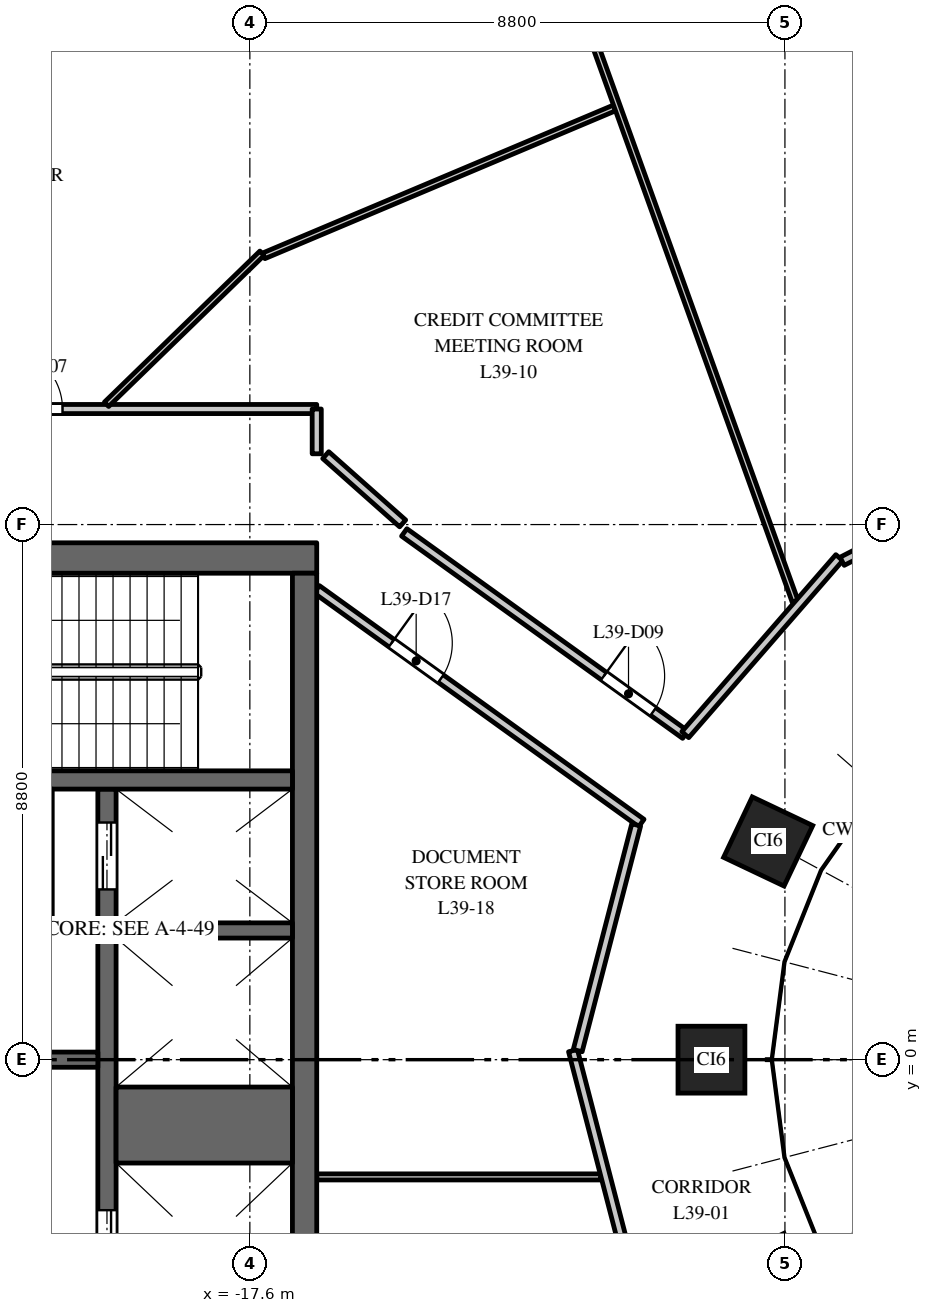
"""IFC4 building model, lengths in metres.
Left out: names, types, materials, properties, quantities, classifications, styles, units other than length and angle.
Written with IfcOpenShell. Run it as: python <this file> out.ifc"""

import sys

from ifc_helpers import new_model, si_unit, direction, frame, frame_2d, origin, origin_2d, place, context, subcontext, project, spatial, rectangle, extrude, element, fill, save


model = new_model("IFC4")
c1 = context("Model", 3, precision=1e-05, world=origin(), true_north=direction((0.0, 1.0)))
c2 = subcontext(c1, "Body", "Model", "MODEL_VIEW")
j1 = project(units=[si_unit("LENGTHUNIT", "METRE"), si_unit("PLANEANGLEUNIT", "RADIAN")], contexts=[c1])
p1 = place(None, origin())
s1 = spatial("IfcSite", under=j1, at=p1, CompositionType="ELEMENT")
p2 = place(p1, origin())
s2 = spatial("IfcBuilding", under=s1, at=p2, CompositionType="ELEMENT")
p3 = place(p2, frame((0.0, 0.0, 170.0)))
s3 = spatial("IfcBuildingStorey", under=s2, at=p3, CompositionType="ELEMENT", Elevation=170.0)
for number, where, z_axis, x_axis in (
    (1, (-9.076, 3.588, 0.0), (0.0, 0.0, 1.0), (-0.429, -0.903, 0.0)),
    (2, (-10.008, 0.0, 0.0), (0.0, 0.0, 1.0), (0.0, -1.0, 0.0)),
):
    element("IfcColumn", number, at=place(p3, frame(where, z_axis=z_axis, x_axis=x_axis)), inside=s3, PredefinedType="COLUMN", context=c2, shape_type="SweptSolid", body=[
        extrude(rectangle(XDim=1.1, YDim=1.1, at=origin_2d()), origin(), (0.0, 0.0, 1.0), 4.0),
    ])
p4 = place(p3, frame((-16.5, 8.25, 0.0), z_axis=(0.0, 0.0, 1.0), x_axis=(-1.0, 0.0, 0.0)))
e3 = element("IfcWall", 3, at=p4, inside=s3, PredefinedType="SHEAR", context=c2, shape_type="SweptSolid", body=[
    extrude(rectangle(XDim=15.0, YDim=0.5, at=frame_2d((7.5, 0.0))), origin(), (0.0, 0.0, 1.0), 3.7),
])
p5 = place(p4, frame((6.9, 0.0, 0.0)))
e4 = element("IfcOpeningElement", 4, at=p5, cuts=e3, PredefinedType="OPENING", context=c2, shape_type="SweptSolid", body=[
    extrude(rectangle(XDim=1.2, YDim=2.1, at=frame_2d((0.6, 1.05))), frame((0.0, 0.26, 0.0), z_axis=(0.0, -1.0, 0.0), x_axis=(1.0, 0.0, 0.0)), (0.0, 0.0, 1.0), 0.52),
])
p6 = place(p4, frame((12.05, 0.0, 0.0)))
e5 = element("IfcOpeningElement", 5, at=p6, cuts=e3, PredefinedType="OPENING", context=c2, shape_type="SweptSolid", body=[
    extrude(rectangle(XDim=0.9, YDim=2.1, at=frame_2d((0.45, 1.05))), frame((0.0, 0.26, 0.0), z_axis=(0.0, -1.0, 0.0), x_axis=(1.0, 0.0, 0.0)), (0.0, 0.0, 1.0), 0.52),
])
p7 = place(p3, frame((-19.95, -4.45, 0.0), z_axis=(0.0, 0.0, 1.0), x_axis=(0.0, 1.0, 0.0)))
e6 = element("IfcWall", 6, at=p7, inside=s3, PredefinedType="SHEAR", context=c2, shape_type="SweptSolid", body=[
    extrude(rectangle(XDim=8.9, YDim=0.3, at=frame_2d((4.45, 0.0))), origin(), (0.0, 0.0, 1.0), 3.7),
])
p8 = place(p7, frame((0.775, 0.0, 0.0)))
e7 = element("IfcOpeningElement", 7, at=p8, cuts=e6, PredefinedType="OPENING", context=c2, shape_type="SweptSolid", body=[
    extrude(rectangle(XDim=1.2, YDim=2.1, at=frame_2d((0.6, 1.05))), frame((0.0, 0.16, 0.0), z_axis=(0.0, -1.0, 0.0), x_axis=(1.0, 0.0, 0.0)), (0.0, 0.0, 1.0), 0.32),
])
p9 = place(p7, frame((7.25, 0.0, 0.0)))
e8 = element("IfcOpeningElement", 8, at=p9, cuts=e6, PredefinedType="OPENING", context=c2, shape_type="SweptSolid", body=[
    extrude(rectangle(XDim=1.1, YDim=2.1, at=frame_2d((0.55, 1.05))), frame((0.0, 0.16, 0.0), z_axis=(0.0, -1.0, 0.0), x_axis=(1.0, 0.0, 0.0)), (0.0, 0.0, 1.0), 0.32),
])
p10 = place(p3, frame((-20.1, 0.0, 0.0), z_axis=(0.0, 0.0, 1.0), x_axis=(-1.0, 0.0, 0.0)))
e9 = element("IfcWall", 9, at=p10, inside=s3, PredefinedType="SHEAR", context=c2, shape_type="SweptSolid", body=[
    extrude(rectangle(XDim=3.28, YDim=0.25, at=frame_2d((1.64, 0.0))), origin(), (0.0, 0.0, 1.0), 3.7),
])
p11 = place(p3, frame((-16.7, -8.0, 0.0), z_axis=(0.0, 0.0, 1.0), x_axis=(0.0, 1.0, 0.0)))
e10 = element("IfcWall", 10, at=p11, inside=s3, PredefinedType="SHEAR", context=c2, shape_type="SweptSolid", body=[
    extrude(rectangle(XDim=16.0, YDim=0.4, at=frame_2d((8.0, 0.0))), origin(), (0.0, 0.0, 1.0), 3.7),
])
p12 = place(p3, frame((-16.9, -1.075, 0.0), z_axis=(0.0, 0.0, 1.0), x_axis=(-1.0, 0.0, 0.0)))
e11 = element("IfcWall", 11, at=p12, inside=s3, PredefinedType="SHEAR", context=c2, shape_type="SweptSolid", body=[
    extrude(rectangle(XDim=2.9, YDim=1.25, at=frame_2d((1.45, 0.0))), origin(), (0.0, 0.0, 1.0), 3.7),
])
p13 = place(p3, frame((-16.9, 2.125, 0.0), z_axis=(0.0, 0.0, 1.0), x_axis=(-1.0, 0.0, 0.0)))
e12 = element("IfcWall", 12, at=p13, inside=s3, PredefinedType="SHEAR", context=c2, shape_type="SweptSolid", body=[
    extrude(rectangle(XDim=2.9, YDim=0.25, at=frame_2d((1.45, 0.0))), origin(), (0.0, 0.0, 1.0), 3.7),
])
p14 = place(p3, frame((-16.9, 4.6, 0.0), z_axis=(0.0, 0.0, 1.0), x_axis=(-1.0, 0.0, 0.0)))
e13 = element("IfcWall", 13, at=p14, inside=s3, PredefinedType="SHEAR", context=c2, shape_type="SweptSolid", body=[
    extrude(rectangle(XDim=6.18, YDim=0.3, at=frame_2d((3.09, 0.0))), origin(), (0.0, 0.0, 1.0), 3.7),
])
p15 = place(p14, frame((4.9, 0.0, 0.0)))
e14 = element("IfcOpeningElement", 14, at=p15, cuts=e13, PredefinedType="OPENING", context=c2, shape_type="SweptSolid", body=[
    extrude(rectangle(XDim=1.1, YDim=2.1, at=frame_2d((0.55, 1.05))), frame((0.0, 0.16, 0.0), z_axis=(0.0, -1.0, 0.0), x_axis=(1.0, 0.0, 0.0)), (0.0, 0.0, 1.0), 0.32),
])
p16 = place(p3, frame((-20.85, 2.125, 0.0), z_axis=(0.0, 0.0, 1.0), x_axis=(-1.0, 0.0, 0.0)))
e15 = element("IfcWall", 15, at=p16, inside=s3, PredefinedType="SHEAR", context=c2, shape_type="SweptSolid", body=[
    extrude(rectangle(XDim=2.53, YDim=0.25, at=frame_2d((1.265, 0.0))), origin(), (0.0, 0.0, 1.0), 3.7),
])
p17 = place(p3, frame((-20.975, 2.25, 0.0), z_axis=(0.0, 0.0, 1.0), x_axis=(0.0, 1.0, 0.0)))
e16 = element("IfcWall", 16, at=p17, inside=s3, PredefinedType="SHEAR", context=c2, shape_type="SweptSolid", body=[
    extrude(rectangle(XDim=2.2, YDim=0.25, at=frame_2d((1.1, 0.0))), origin(), (0.0, 0.0, 1.0), 3.7),
])
p18 = place(p3, frame((-31.5, 10.7, 0.0), z_axis=(0.0, 0.0, 1.0), x_axis=(1.0, 0.0, 0.0)))
e17 = element("IfcWall", 17, at=p18, inside=s3, PredefinedType="PARTITIONING", context=c2, shape_type="SweptSolid", body=[
    extrude(rectangle(XDim=15.0, YDim=0.15, at=frame_2d((7.5, 0.0))), origin(), (0.0, 0.0, 1.0), 3.1),
])
p19 = place(p18, frame((9.819, 0.0, 0.0)))
e18 = element("IfcOpeningElement", 18, at=p19, cuts=e17, PredefinedType="OPENING", context=c2, shape_type="SweptSolid", body=[
    extrude(rectangle(XDim=1.0, YDim=2.1, at=frame_2d((0.5, 1.05))), frame((0.0, 0.085, 0.0), z_axis=(0.0, -1.0, 0.0), x_axis=(1.0, 0.0, 0.0)), (0.0, 0.0, 1.0), 0.17),
])
p20 = place(p3, frame((-19.957, 10.778, 0.0), z_axis=(0.0, 0.0, 1.0), x_axis=(0.717304806733, 0.696759509614, 0.0)))
e19 = element("IfcWall", 19, at=p20, inside=s3, PredefinedType="PARTITIONING", context=c2, shape_type="SweptSolid", body=[
    extrude(rectangle(XDim=3.565, YDim=0.1, at=frame_2d((1.782, 0.0))), origin(), (0.0, 0.0, 1.0), 2.75),
])
p21 = place(p3, frame((-17.372, 13.219, 0.0), z_axis=(0.0, 0.0, 1.0), x_axis=(0.921428289763, 0.38854846136, 0.0)))
e20 = element("IfcWall", 20, at=p21, inside=s3, PredefinedType="PARTITIONING", context=c2, shape_type="SweptSolid", body=[
    extrude(rectangle(XDim=6.262, YDim=0.1, at=frame_2d((3.131, 0.0))), origin(), (0.0, 0.0, 1.0), 2.85),
])
p22 = place(p3, frame((-16.5, -1.928, 0.0), z_axis=(0.0, 0.0, 1.0), x_axis=(1.0, 0.0, 0.0)))
e21 = element("IfcWall", 21, at=p22, inside=s3, PredefinedType="PARTITIONING", context=c2, shape_type="SweptSolid", body=[
    extrude(rectangle(XDim=4.672, YDim=0.1, at=frame_2d((2.336, 0.0))), origin(), (0.0, 0.0, 1.0), 3.7),
])
p23 = place(p3, frame((-16.5, 9.964, 0.0), z_axis=(0.0, 0.0, 1.0), x_axis=(0.0, 1.0, 0.0)))
e22 = element("IfcWall", 22, at=p23, inside=s3, PredefinedType="PARTITIONING", context=c2, shape_type="SweptSolid", body=[
    extrude(rectangle(XDim=0.736, YDim=0.15, at=frame_2d((0.368, 0.0))), origin(), (0.0, 0.0, 1.0), 3.7),
])
p24 = place(p3, frame((-16.5, 7.735, 0.0), z_axis=(0.0, 0.0, 1.0), x_axis=(0.811616692984, -0.584190331715, 0.0)))
e23 = element("IfcWall", 23, at=p24, inside=s3, PredefinedType="PARTITIONING", context=c2, shape_type="SweptSolid", body=[
    extrude(rectangle(XDim=6.578, YDim=0.15, at=frame_2d((3.289, 0.0))), origin(), (0.0, 0.0, 1.0), 3.7),
])
p25 = place(p24, frame((1.515, 0.0, 0.0)))
e24 = element("IfcOpeningElement", 24, at=p25, cuts=e23, PredefinedType="OPENING", context=c2, shape_type="SweptSolid", body=[
    extrude(rectangle(XDim=1.0, YDim=2.1, at=frame_2d((0.5, 1.05))), frame((0.0, 0.085, 0.0), z_axis=(0.0, -1.0, 0.0), x_axis=(1.0, 0.0, 0.0)), (0.0, 0.0, 1.0), 0.17),
])
p26 = place(p3, frame((-15.061, 8.671, 0.0), z_axis=(0.0, 0.0, 1.0), x_axis=(0.811697765448, -0.584077681106, 0.0)))
e25 = element("IfcWall", 25, at=p26, inside=s3, PredefinedType="PARTITIONING", context=c2, shape_type="SweptSolid", body=[
    extrude(rectangle(XDim=5.694, YDim=0.15, at=frame_2d((2.847, 0.0))), origin(), (0.0, 0.0, 1.0), 3.7),
])
p27 = place(p26, frame((4.044, 0.0, 0.0)))
e26 = element("IfcOpeningElement", 26, at=p27, cuts=e25, PredefinedType="OPENING", context=c2, shape_type="SweptSolid", body=[
    extrude(rectangle(XDim=1.0, YDim=2.1, at=frame_2d((0.5, 1.05))), frame((0.0, 0.085, 0.0), z_axis=(0.0, -1.0, 0.0), x_axis=(1.0, 0.0, 0.0)), (0.0, 0.0, 1.0), 0.17),
])
p28 = place(p3, frame((-15.048, 25.383, 0.0), z_axis=(0.0, 0.0, 1.0), x_axis=(0.33832146485, -0.941030598026, 0.0)))
e27 = element("IfcWall", 27, at=p28, inside=s3, PredefinedType="PARTITIONING", context=c2, shape_type="SweptSolid", body=[
    extrude(rectangle(XDim=18.964, YDim=0.1, at=frame_2d((9.482, 0.0))), origin(), (0.0, 0.0, 1.0), 2.85),
])
p29 = place(p3, frame((-12.286, 0.149, 0.0), z_axis=(0.0, 0.0, 1.0), x_axis=(0.250998973278, -0.96798735292, 0.0)))
e28 = element("IfcWall", 28, at=p29, inside=s3, PredefinedType="PARTITIONING", context=c2, shape_type="SweptSolid", body=[
    extrude(rectangle(XDim=4.143, YDim=0.15, at=frame_2d((2.071, 0.0))), origin(), (0.0, 0.0, 1.0), 3.7),
])
p30 = place(p3, frame((-12.208, 0.149, 0.0), z_axis=(0.0, 0.0, 1.0), x_axis=(0.250840636591, 0.968028395779, 0.0)))
e29 = element("IfcWall", 29, at=p30, inside=s3, PredefinedType="PARTITIONING", context=c2, shape_type="SweptSolid", body=[
    extrude(rectangle(XDim=3.835, YDim=0.15, at=frame_2d((1.917, 0.0))), origin(), (0.0, 0.0, 1.0), 3.7),
])
p31 = place(p3, frame((-10.439, 5.345, 0.0), z_axis=(0.0, 0.0, 1.0), x_axis=(0.656405809938, 0.754407988213, 0.0)))
e30 = element("IfcWall", 30, at=p31, inside=s3, PredefinedType="PARTITIONING", context=c2, shape_type="SweptSolid", body=[
    extrude(rectangle(XDim=3.859, YDim=0.15, at=frame_2d((1.929, 0.0))), origin(), (0.0, 0.0, 1.0), 2.75),
])
p32 = place(p3, frame((-7.859, 8.196, 0.0), z_axis=(0.0, 0.0, 1.0), x_axis=(0.889405670308, 0.457118752213, 0.0)))
e31 = element("IfcWall", 31, at=p32, inside=s3, PredefinedType="PARTITIONING", context=c2, shape_type="SweptSolid", body=[
    extrude(rectangle(XDim=4.355, YDim=0.15, at=frame_2d((2.178, 0.0))), origin(), (0.0, 0.0, 1.0), 2.85),
])
p33 = place(p32, frame((0.491, 0.0, 0.0)))
e32 = element("IfcOpeningElement", 32, at=p33, cuts=e31, PredefinedType="OPENING", context=c2, shape_type="SweptSolid", body=[
    extrude(rectangle(XDim=1.0, YDim=2.1, at=frame_2d((0.5, 1.05))), frame((0.0, 0.085, 0.0), z_axis=(0.0, -1.0, 0.0), x_axis=(1.0, 0.0, 0.0)), (0.0, 0.0, 1.0), 0.17),
])
p34 = place(p3, frame((-16.352, 9.942, 0.0), z_axis=(0.0, 0.0, 1.0), x_axis=(0.747926695066, -0.663781333579, 0.0)))
e33 = element("IfcWall", 33, at=p34, inside=s3, PredefinedType="PARTITIONING", context=c2, shape_type="SweptSolid", body=[
    extrude(rectangle(XDim=1.691, YDim=0.15, at=frame_2d((0.846, 0.0))), origin(), (0.0, 0.0, 1.0), 3.7),
])
p35 = place(p8, origin())
e34 = element("IfcDoor", 34, at=p35, inside=s3, OperationType="DOUBLE_DOOR_SLIDING", PredefinedType="DOOR", context=c2, shape_type="SweptSolid", body=[
    extrude(rectangle(XDim=1.2, YDim=2.1, at=frame_2d((0.6, 1.05))), frame((0.0, 0.025, 0.0), z_axis=(0.0, -1.0, 0.0), x_axis=(1.0, 0.0, 0.0)), (0.0, 0.0, 1.0), 0.05),
])
fill(e7, e34)
p36 = place(p9, origin())
e35 = element("IfcDoor", 35, at=p36, inside=s3, OperationType="DOUBLE_DOOR_SLIDING", PredefinedType="DOOR", context=c2, shape_type="SweptSolid", body=[
    extrude(rectangle(XDim=1.1, YDim=2.1, at=frame_2d((0.55, 1.05))), frame((0.0, 0.025, 0.0), z_axis=(0.0, -1.0, 0.0), x_axis=(1.0, 0.0, 0.0)), (0.0, 0.0, 1.0), 0.05),
])
fill(e8, e35)
p37 = place(p19, origin())
e36 = element("IfcDoor", 36, at=p37, inside=s3, OperationType="SINGLE_SWING_LEFT", PredefinedType="DOOR", context=c2, shape_type="SweptSolid", body=[
    extrude(rectangle(XDim=1.0, YDim=2.1, at=frame_2d((0.5, 1.05))), frame((0.0, 0.025, 0.0), z_axis=(0.0, -1.0, 0.0), x_axis=(1.0, 0.0, 0.0)), (0.0, 0.0, 1.0), 0.05),
])
fill(e18, e36)
p38 = place(p27, origin())
e37 = element("IfcDoor", 37, at=p38, inside=s3, OperationType="SINGLE_SWING_LEFT", PredefinedType="DOOR", context=c2, shape_type="SweptSolid", body=[
    extrude(rectangle(XDim=1.0, YDim=2.1, at=frame_2d((0.5, 1.05))), frame((0.0, 0.025, 0.0), z_axis=(0.0, -1.0, 0.0), x_axis=(1.0, 0.0, 0.0)), (0.0, 0.0, 1.0), 0.05),
])
fill(e26, e37)
p39 = place(p25, origin())
e38 = element("IfcDoor", 38, at=p39, inside=s3, OperationType="SINGLE_SWING_LEFT", PredefinedType="DOOR", context=c2, shape_type="SweptSolid", body=[
    extrude(rectangle(XDim=1.0, YDim=2.1, at=frame_2d((0.5, 1.05))), frame((0.0, 0.025, 0.0), z_axis=(0.0, -1.0, 0.0), x_axis=(1.0, 0.0, 0.0)), (0.0, 0.0, 1.0), 0.05),
])
fill(e24, e38)
save(model, sys.argv[1])
